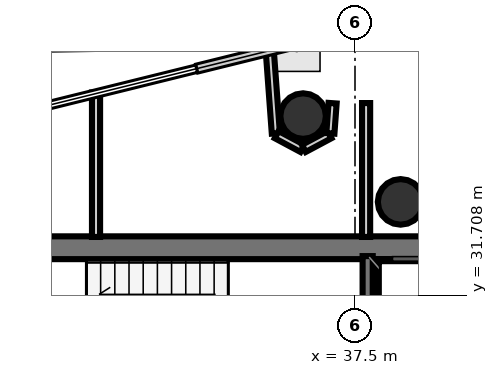
"""IFC4 building model, lengths in metres.
Left out: names, types, materials, properties, quantities, classifications, styles, units other than length and angle.
Written with IfcOpenShell. Run it as: python <this file> out.ifc"""

import sys

from ifc_helpers import new_model, si_unit, direction, frame, frame_2d, origin, origin_2d, place, context, subcontext, project, spatial, rectangle, hollow_circle, extrude, element, save


model = new_model("IFC4")
c1 = context("Model", 3, precision=1e-05, world=origin(), true_north=direction((0.0, 1.0)))
c2 = subcontext(c1, "Body", "Model", "MODEL_VIEW")
j1 = project(units=[si_unit("LENGTHUNIT", "METRE"), si_unit("PLANEANGLEUNIT", "RADIAN")], contexts=[c1])
p1 = place(None, origin())
s1 = spatial("IfcSite", under=j1, at=p1, CompositionType="ELEMENT")
p2 = place(p1, origin())
s2 = spatial("IfcBuilding", under=s1, at=p2, CompositionType="ELEMENT")
p3 = place(p2, frame((0.0, 0.0, 310.2)))
s3 = spatial("IfcBuildingStorey", under=s2, at=p3, CompositionType="ELEMENT", Elevation=310.2)
p4 = place(p3, frame((29.33, 32.645, 0.0), z_axis=(0.0, 0.0, 1.0), x_axis=(1.0, 0.0, 0.0)))
e1 = element("IfcWall", 1, at=p4, inside=s3, PredefinedType="SHEAR", context=c2, shape_type="SweptSolid", body=[
    extrude(rectangle(XDim=10.52, YDim=0.45, at=frame_2d((5.26, 0.0))), origin(), (0.0, 0.0, 1.0), 3.52),
])
p5 = place(p4, frame((0.895, 0.0, 0.0)))
e2 = element("IfcOpeningElement", 2, at=p5, cuts=e1, PredefinedType="OPENING", context=c2, shape_type="SweptSolid", body=[
    extrude(rectangle(XDim=1.25, YDim=2.15, at=frame_2d((0.625, 1.075))), frame((0.0, 0.235, 0.0), z_axis=(0.0, -1.0, 0.0), x_axis=(1.0, 0.0, 0.0)), (0.0, 0.0, 1.0), 0.47),
])
p6 = place(p3, frame((38.18, 24.98, 0.0), z_axis=(0.0, 0.0, 1.0), x_axis=(0.0, 1.0, 0.0)))
e3 = element("IfcWall", 3, at=p6, inside=s3, PredefinedType="SHEAR", context=c2, shape_type="SweptSolid", body=[
    extrude(rectangle(XDim=7.44, YDim=0.45, at=frame_2d((3.72, 0.0))), origin(), (0.0, 0.0, 1.0), 3.52),
])
for number, where, z_axis, x_axis in (
    (4, (38.4, 33.55, 0.0), (0.0, 0.0, 1.0), (1.0, 0.0, 0.0)),
    (5, (36.476, 35.243, 0.0), (0.0, 0.0, 1.0), (1.0, 0.0, 0.0)),
):
    element("IfcColumn", number, at=place(p3, frame(where, z_axis=z_axis, x_axis=x_axis)), inside=s3, PredefinedType="COLUMN", context=c2, shape_type="SweptSolid", body=[
        extrude(hollow_circle(Radius=0.45, WallThickness=0.025, at=origin_2d()), origin(), (0.0, 0.0, 1.0), 3.7),
    ])
p7 = place(p3, frame((37.75, 30.12, 0.0), z_axis=(0.0, 0.0, 1.0), x_axis=(0.0, 1.0, 0.0)))
e6 = element("IfcWall", 6, at=p7, inside=s3, PredefinedType="SOLIDWALL", context=c2, shape_type="SweptSolid", body=[
    extrude(rectangle(XDim=2.36, YDim=0.2, at=frame_2d((1.18, 0.0))), origin(), (0.0, 0.0, 1.0), 3.52),
])
p8 = place(p3, frame((32.389, 35.708, 0.0), z_axis=(0.0, 0.0, 1.0), x_axis=(0.0, -1.0, 0.0)))
e7 = element("IfcWall", 7, at=p8, inside=s3, PredefinedType="PARTITIONING", context=c2, shape_type="SweptSolid", body=[
    extrude(rectangle(XDim=2.85, YDim=0.16, at=frame_2d((1.425, 0.0))), origin(), (0.0, 0.0, 1.0), 2.84),
])
p9 = place(p3, frame((35.816, 36.555, 0.0), z_axis=(0.0, 0.0, 1.0), x_axis=(0.073329289275, -0.997307783653, 0.0)))
e8 = element("IfcWall", 8, at=p9, inside=s3, PredefinedType="PARTITIONING", context=c2, shape_type="SweptSolid", body=[
    extrude(rectangle(XDim=1.658, YDim=0.16, at=frame_2d((0.829, 0.0))), origin(), (0.0, 0.0, 1.0), 2.84),
])
for number, where, z_axis, x_axis in (
    (9, (35.954, 34.877, 0.0), (0.0, 0.0, 1.0), (0.882, -0.471, 0.0)),
    (10, (36.49, 34.606, 0.0), (0.0, 0.0, 1.0), (0.882, 0.471, 0.0)),
):
    element("IfcWall", number, at=place(p3, frame(where, z_axis=z_axis, x_axis=x_axis)), inside=s3, PredefinedType="PARTITIONING", context=c2, shape_type="SweptSolid", body=[
        extrude(rectangle(XDim=0.575, YDim=0.16, at=frame_2d((0.288, 0.0))), origin(), (0.0, 0.0, 1.0), 2.84),
    ])
p10 = place(p3, frame((37.014, 34.902, 0.0), z_axis=(0.0, 0.0, 1.0), x_axis=(0.073134230676, 0.997322106595, 0.0)))
e11 = element("IfcWall", 11, at=p10, inside=s3, PredefinedType="PARTITIONING", context=c2, shape_type="SweptSolid", body=[
    extrude(rectangle(XDim=0.598, YDim=0.16, at=frame_2d((0.299, 0.0))), origin(), (0.0, 0.0, 1.0), 2.84),
])
p11 = place(p3, frame((37.719, 35.5, 0.0), z_axis=(0.0, 0.0, 1.0), x_axis=(0.0, -1.0, 0.0)))
e12 = element("IfcWall", 12, at=p11, inside=s3, PredefinedType="PARTITIONING", context=c2, shape_type="SweptSolid", body=[
    extrude(rectangle(XDim=2.642, YDim=0.16, at=frame_2d((1.321, 0.0))), origin(), (0.0, 0.0, 1.0), 2.84),
])
save(model, sys.argv[1])
